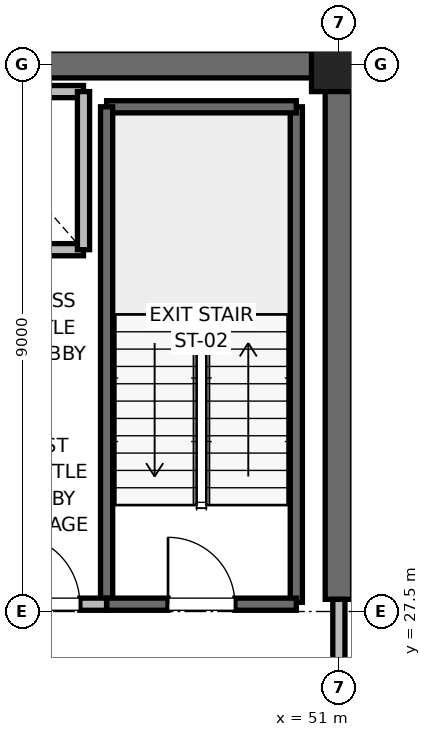
"""IFC4 building model, lengths in metres.
Left out: names, types, materials, properties, quantities, classifications, styles, units other than length and angle.
Written with IfcOpenShell. Run it as: python <this file> out.ifc"""

import sys

from ifc_helpers import new_model, si_unit, direction, frame, frame_2d, origin, origin_2d, place, context, subcontext, project, spatial, rectangle, extrude, element, fill, save


model = new_model("IFC4")
c1 = context("Model", 3, precision=1e-05, world=origin(), true_north=direction((0.0, 1.0)))
c2 = subcontext(c1, "Body", "Model", "MODEL_VIEW")
j1 = project(units=[si_unit("LENGTHUNIT", "METRE"), si_unit("PLANEANGLEUNIT", "RADIAN")], contexts=[c1])
p1 = place(None, origin())
s1 = spatial("IfcSite", under=j1, at=p1, CompositionType="ELEMENT")
p2 = place(p1, origin())
s2 = spatial("IfcBuilding", under=s1, at=p2, CompositionType="ELEMENT")
p3 = place(p2, frame((0.0, 0.0, 271.2)))
s3 = spatial("IfcBuildingStorey", under=s2, at=p3, CompositionType="ELEMENT", Elevation=271.2)
p4 = place(p3, frame((51.0, 36.5, 0.0), z_axis=(0.0, 0.0, 1.0), x_axis=(1.0, 0.0, 0.0)))
e1 = element("IfcColumn", 1, at=p4, inside=s3, PredefinedType="PILASTER", context=c2, shape_type="SweptSolid", body=[
    extrude(rectangle(XDim=0.9, YDim=0.9, at=origin_2d()), origin(), (0.0, 0.0, 1.0), 4.0),
])
p5 = place(p3, frame((45.2, 36.5, 0.0), z_axis=(0.0, 0.0, 1.0), x_axis=(1.0, 0.0, 0.0)))
e2 = element("IfcWall", 2, at=p5, inside=s3, PredefinedType="SHEAR", context=c2, shape_type="SweptSolid", body=[
    extrude(rectangle(XDim=5.8, YDim=0.45, at=frame_2d((2.9, 0.0))), origin(), (0.0, 0.0, 1.0), 3.785),
])
p6 = place(p3, frame((51.0, 27.7, 0.0), z_axis=(0.0, 0.0, 1.0), x_axis=(0.0, 1.0, 0.0)))
e3 = element("IfcWall", 3, at=p6, inside=s3, PredefinedType="SHEAR", context=c2, shape_type="SweptSolid", body=[
    extrude(rectangle(XDim=8.8, YDim=0.45, at=frame_2d((4.4, 0.0))), origin(), (0.0, 0.0, 1.0), 3.785),
])
p7 = place(p3, frame((50.3, 27.65, 0.0), z_axis=(0.0, 0.0, 1.0), x_axis=(0.0, 1.0, 0.0)))
e4 = element("IfcWall", 4, at=p7, inside=s3, PredefinedType="SOLIDWALL", context=c2, shape_type="SweptSolid", body=[
    extrude(rectangle(XDim=8.15, YDim=0.2, at=frame_2d((4.075, 0.0))), origin(), (0.0, 0.0, 1.0), 3.785),
])
p8 = place(p3, frame((47.18, 35.8, 0.0), z_axis=(0.0, 0.0, 1.0), x_axis=(1.0, 0.0, 0.0)))
e5 = element("IfcWall", 5, at=p8, inside=s3, PredefinedType="SOLIDWALL", context=c2, shape_type="SweptSolid", body=[
    extrude(rectangle(XDim=3.12, YDim=0.2, at=frame_2d((1.56, 0.0))), origin(), (0.0, 0.0, 1.0), 3.785),
])
p9 = place(p3, frame((47.18, 27.62, 0.0), z_axis=(0.0, 0.0, 1.0), x_axis=(0.0, 1.0, 0.0)))
e6 = element("IfcWall", 6, at=p9, inside=s3, PredefinedType="SOLIDWALL", context=c2, shape_type="SweptSolid", body=[
    extrude(rectangle(XDim=8.18, YDim=0.2, at=frame_2d((4.09, 0.0))), origin(), (0.0, 0.0, 1.0), 3.785),
])
p10 = place(p3, frame((47.18, 27.62, 0.0), z_axis=(0.0, 0.0, 1.0), x_axis=(1.0, 0.0, 0.0)))
e7 = element("IfcWall", 7, at=p10, inside=s3, PredefinedType="SOLIDWALL", context=c2, shape_type="SweptSolid", body=[
    extrude(rectangle(XDim=3.12, YDim=0.2, at=frame_2d((1.56, 0.0))), origin(), (0.0, 0.0, 1.0), 3.785),
])
p11 = place(p10, frame((1.01, 0.0, 0.0)))
e8 = element("IfcOpeningElement", 8, at=p11, cuts=e7, PredefinedType="OPENING", context=c2, shape_type="SweptSolid", body=[
    extrude(rectangle(XDim=1.1, YDim=2.15, at=frame_2d((0.55, 1.075))), frame((0.0, 0.1, 0.0), z_axis=(0.0, -1.0, 0.0), x_axis=(1.0, 0.0, 0.0)), (0.0, 0.0, 1.0), 0.2),
])
p12 = place(p3, frame((45.15, 27.62, 0.0), z_axis=(0.0, 0.0, 1.0), x_axis=(1.0, 0.0, 0.0)))
e9 = element("IfcWall", 9, at=p12, inside=s3, PredefinedType="PARTITIONING", context=c2, shape_type="SweptSolid", body=[
    extrude(rectangle(XDim=2.03, YDim=0.2, at=frame_2d((1.015, 0.0))), origin(), (0.0, 0.0, 1.0), 3.785),
])
p13 = place(p12, frame((0.44, 0.0, 0.0)))
e10 = element("IfcOpeningElement", 10, at=p13, cuts=e9, PredefinedType="OPENING", context=c2, shape_type="SweptSolid", body=[
    extrude(rectangle(XDim=1.15, YDim=2.2, at=frame_2d((0.575, 1.1))), frame((0.0, 0.1, 0.0), z_axis=(0.0, -1.0, 0.0), x_axis=(1.0, 0.0, 0.0)), (0.0, 0.0, 1.0), 0.2),
])
p14 = place(p3, frame((51.0, 24.3, 0.0), z_axis=(0.0, 0.0, 1.0), x_axis=(0.0, 1.0, 0.0)))
e11 = element("IfcWall", 11, at=p14, inside=s3, PredefinedType="PARTITIONING", context=c2, shape_type="SweptSolid", body=[
    extrude(rectangle(XDim=3.4, YDim=0.2, at=frame_2d((1.7, 0.0))), origin(), (0.0, 0.0, 1.0), 2.865),
])
p15 = place(p14, frame((1.125, 0.0, 0.0)))
e12 = element("IfcOpeningElement", 12, at=p15, cuts=e11, PredefinedType="OPENING", context=c2, shape_type="SweptSolid", body=[
    extrude(rectangle(XDim=1.15, YDim=2.2, at=frame_2d((0.575, 1.1))), frame((0.0, 0.1, 0.0), z_axis=(0.0, -1.0, 0.0), x_axis=(1.0, 0.0, 0.0)), (0.0, 0.0, 1.0), 0.2),
])
p16 = place(p3, frame((44.5, 33.45, 0.0), z_axis=(0.0, 0.0, 1.0), x_axis=(1.0, 0.0, 0.0)))
e13 = element("IfcWall", 13, at=p16, inside=s3, PredefinedType="SOLIDWALL", context=c2, shape_type="SweptSolid", body=[
    extrude(rectangle(XDim=2.3, YDim=0.2, at=frame_2d((1.15, 0.0))), origin(), (0.0, 0.0, 1.0), 3.785),
])
p17 = place(p3, frame((46.8, 36.05, 0.0), z_axis=(0.0, 0.0, 1.0), x_axis=(-1.0, 0.0, 0.0)))
e14 = element("IfcWall", 14, at=p17, inside=s3, PredefinedType="SOLIDWALL", context=c2, shape_type="SweptSolid", body=[
    extrude(rectangle(XDim=2.3, YDim=0.2, at=frame_2d((1.15, 0.0))), origin(), (0.0, 0.0, 1.0), 2.865),
])
p18 = place(p3, frame((46.8, 33.45, 0.0), z_axis=(0.0, 0.0, 1.0), x_axis=(0.0, 1.0, 0.0)))
e15 = element("IfcWall", 15, at=p18, inside=s3, PredefinedType="SOLIDWALL", context=c2, shape_type="SweptSolid", body=[
    extrude(rectangle(XDim=2.6, YDim=0.2, at=frame_2d((1.3, 0.0))), origin(), (0.0, 0.0, 1.0), 3.785),
])
p19 = place(p11, origin())
e16 = element("IfcDoor", 16, at=p19, inside=s3, OperationType="SINGLE_SWING_LEFT", PredefinedType="DOOR", context=c2, shape_type="SweptSolid", body=[
    extrude(rectangle(XDim=1.1, YDim=2.15, at=frame_2d((0.55, 1.075))), frame((0.0, 0.025, 0.0), z_axis=(0.0, -1.0, 0.0), x_axis=(1.0, 0.0, 0.0)), (0.0, 0.0, 1.0), 0.05),
])
fill(e8, e16)
p20 = place(p13, origin())
e17 = element("IfcDoor", 17, at=p20, inside=s3, OperationType="SINGLE_SWING_LEFT", PredefinedType="DOOR", context=c2, shape_type="SweptSolid", body=[
    extrude(rectangle(XDim=1.15, YDim=2.2, at=frame_2d((0.575, 1.1))), frame((0.0, 0.025, 0.0), z_axis=(0.0, -1.0, 0.0), x_axis=(1.0, 0.0, 0.0)), (0.0, 0.0, 1.0), 0.05),
])
fill(e10, e17)
save(model, sys.argv[1])
